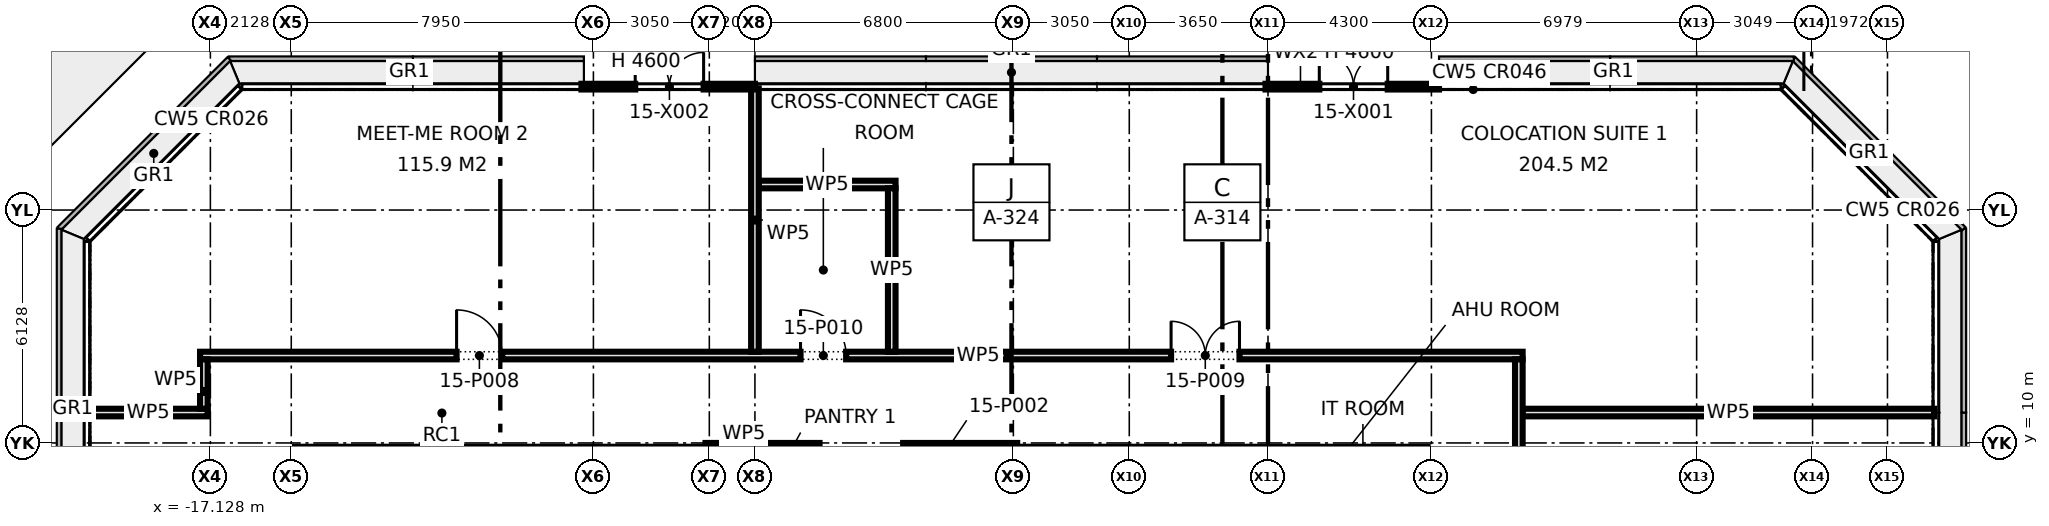
"""IFC4 building model, lengths in metres.
Left out: names, types, materials, properties, quantities, classifications, styles, units other than length and angle.
Written with IfcOpenShell. Run it as: python <this file> out.ifc"""

import sys

from ifc_helpers import new_model, si_unit, direction, frame, frame_2d, origin, place, context, subcontext, project, spatial, rectangle, extrude, element, fill, save


model = new_model("IFC4")
c1 = context("Model", 3, precision=1e-05, world=origin(), true_north=direction((0.0, 1.0)))
c2 = subcontext(c1, "Body", "Model", "MODEL_VIEW")
j1 = project(units=[si_unit("LENGTHUNIT", "METRE"), si_unit("PLANEANGLEUNIT", "RADIAN")], contexts=[c1])
p1 = place(None, origin())
s1 = spatial("IfcSite", under=j1, at=p1, CompositionType="ELEMENT")
p2 = place(p1, origin())
s2 = spatial("IfcBuilding", under=s1, at=p2, CompositionType="ELEMENT")
p3 = place(p2, frame((0.0, 0.0, 68.6)))
s3 = spatial("IfcBuildingStorey", under=s2, at=p3, CompositionType="ELEMENT", Elevation=68.6)
p4 = place(p3, frame((15.2, 19.375, 0.0), z_axis=(0.0, 0.0, 1.0), x_axis=(-1.0, 0.0, 0.0)))
e1 = element("IfcWall", 1, at=p4, inside=s3, PredefinedType="STANDARD", context=c2, shape_type="SweptSolid", body=[
    extrude(rectangle(XDim=4.565, YDim=0.15, at=frame_2d((2.282, 0.0))), origin(), (0.0, 0.0, 1.0), 4.6),
])
p5 = place(p4, frame((1.35, 0.0, 0.0)))
e2 = element("IfcOpeningElement", 2, at=p5, cuts=e1, PredefinedType="OPENING", context=c2, shape_type="SweptSolid", body=[
    extrude(rectangle(XDim=1.8, YDim=2.1, at=frame_2d((0.9, 1.05))), frame((0.0, 0.085, 0.0), z_axis=(0.0, -1.0, 0.0), x_axis=(1.0, 0.0, 0.0)), (0.0, 0.0, 1.0), 0.17),
])
p6 = place(p3, frame((-2.8, 19.375, 0.0), z_axis=(0.0, 0.0, 1.0), x_axis=(-1.0, 0.0, 0.0)))
e3 = element("IfcWall", 3, at=p6, inside=s3, PredefinedType="STANDARD", context=c2, shape_type="SweptSolid", body=[
    extrude(rectangle(XDim=4.565, YDim=0.15, at=frame_2d((2.282, 0.0))), origin(), (0.0, 0.0, 1.0), 4.6),
])
p7 = place(p6, frame((1.35, 0.0, 0.0)))
e4 = element("IfcOpeningElement", 4, at=p7, cuts=e3, PredefinedType="OPENING", context=c2, shape_type="SweptSolid", body=[
    extrude(rectangle(XDim=1.8, YDim=2.1, at=frame_2d((0.9, 1.05))), frame((0.0, 0.085, 0.0), z_axis=(0.0, -1.0, 0.0), x_axis=(1.0, 0.0, 0.0)), (0.0, 0.0, 1.0), 0.17),
])
for number, where, z_axis, x_axis in (
    (5, (-4.1, 9.9, 0.0), (0.0, 0.0, 1.0), (1.0, 0.0, 0.0)),
    (6, (1.1, 9.9, 0.0), (0.0, 0.0, 1.0), (1.0, 0.0, 0.0)),
):
    element("IfcWall", number, at=place(p3, frame(where, z_axis=z_axis, x_axis=x_axis)), inside=s3, PredefinedType="PARTITIONING", context=c2, shape_type="SweptSolid", body=[
        extrude(rectangle(XDim=3.0, YDim=0.2, at=frame_2d((1.5, 0.0))), origin(), (0.0, 0.0, 1.0), 3.463),
    ])
p8 = place(p3, frame((-20.33, 10.8, 0.0), z_axis=(0.0, 0.0, 1.0), x_axis=(1.0, 0.0, 0.0)))
e7 = element("IfcWall", 7, at=p8, inside=s3, PredefinedType="PARTITIONING", context=c2, shape_type="SweptSolid", body=[
    extrude(rectangle(XDim=3.13, YDim=0.2, at=frame_2d((1.565, 0.0))), origin(), (0.0, 0.0, 1.0), 4.4),
])
p9 = place(p3, frame((17.4, 10.8, 0.0), z_axis=(0.0, 0.0, 1.0), x_axis=(1.0, 0.0, 0.0)))
e8 = element("IfcWall", 8, at=p9, inside=s3, PredefinedType="PARTITIONING", context=c2, shape_type="SweptSolid", body=[
    extrude(rectangle(XDim=10.83, YDim=0.2, at=frame_2d((5.415, 0.0))), origin(), (0.0, 0.0, 1.0), 4.4),
])
p10 = place(p3, frame((-17.4, 12.3, 0.0), z_axis=(0.0, 0.0, 1.0), x_axis=(1.0, 0.0, 0.0)))
e9 = element("IfcWall", 9, at=p10, inside=s3, PredefinedType="PARTITIONING", context=c2, shape_type="SweptSolid", body=[
    extrude(rectangle(XDim=34.8, YDim=0.2, at=frame_2d((17.4, 0.0))), origin(), (0.0, 0.0, 1.0), 4.4),
])
p11 = place(p10, frame((6.75, 0.0, 0.0)))
e10 = element("IfcOpeningElement", 10, at=p11, cuts=e9, PredefinedType="OPENING", context=c2, shape_type="SweptSolid", body=[
    extrude(rectangle(XDim=1.2, YDim=2.1, at=frame_2d((0.6, 1.05))), frame((0.0, 0.11, 0.0), z_axis=(0.0, -1.0, 0.0), x_axis=(1.0, 0.0, 0.0)), (0.0, 0.0, 1.0), 0.22),
])
p12 = place(p10, frame((25.55, 0.0, 0.0)))
e11 = element("IfcOpeningElement", 11, at=p12, cuts=e9, PredefinedType="OPENING", context=c2, shape_type="SweptSolid", body=[
    extrude(rectangle(XDim=1.8, YDim=2.1, at=frame_2d((0.9, 1.05))), frame((0.0, 0.11, 0.0), z_axis=(0.0, -1.0, 0.0), x_axis=(1.0, 0.0, 0.0)), (0.0, 0.0, 1.0), 0.22),
])
p13 = place(p10, frame((15.8, 0.0, 0.0)))
e12 = element("IfcOpeningElement", 12, at=p13, cuts=e9, PredefinedType="OPENING", context=c2, shape_type="SweptSolid", body=[
    extrude(rectangle(XDim=1.2, YDim=2.1, at=frame_2d((0.6, 1.05))), frame((0.0, 0.11, 0.0), z_axis=(0.0, -1.0, 0.0), x_axis=(1.0, 0.0, 0.0)), (0.0, 0.0, 1.0), 0.22),
])
p14 = place(p3, frame((-2.7, 16.8, 0.0), z_axis=(0.0, 0.0, 1.0), x_axis=(1.0, 0.0, 0.0)))
e13 = element("IfcWall", 13, at=p14, inside=s3, PredefinedType="PARTITIONING", context=c2, shape_type="SweptSolid", body=[
    extrude(rectangle(XDim=3.6, YDim=0.2, at=frame_2d((1.8, 0.0))), origin(), (0.0, 0.0, 1.0), 4.4),
])
p15 = place(p3, frame((17.3, -12.2, 0.0), z_axis=(0.0, 0.0, 1.0), x_axis=(0.0, 1.0, 0.0)))
e14 = element("IfcWall", 14, at=p15, inside=s3, PredefinedType="PARTITIONING", context=c2, shape_type="SweptSolid", body=[
    extrude(rectangle(XDim=24.4, YDim=0.2, at=frame_2d((12.2, 0.0))), origin(), (0.0, 0.0, 1.0), 4.4),
])
p16 = place(p15, frame((6.35, 0.0, 0.0)))
e15 = element("IfcOpeningElement", 15, at=p16, cuts=e14, PredefinedType="OPENING", context=c2, shape_type="SweptSolid", body=[
    extrude(rectangle(XDim=1.2, YDim=2.1, at=frame_2d((0.6, 1.05))), frame((0.0, 0.11, 0.0), z_axis=(0.0, -1.0, 0.0), x_axis=(1.0, 0.0, 0.0)), (0.0, 0.0, 1.0), 0.22),
])
p17 = place(p15, frame((17.6, 0.0, 0.0)))
e16 = element("IfcOpeningElement", 16, at=p17, cuts=e14, PredefinedType="OPENING", context=c2, shape_type="SweptSolid", body=[
    extrude(rectangle(XDim=1.8, YDim=2.1, at=frame_2d((0.9, 1.05))), frame((0.0, 0.11, 0.0), z_axis=(0.0, -1.0, 0.0), x_axis=(1.0, 0.0, 0.0)), (0.0, 0.0, 1.0), 0.22),
])
p18 = place(p3, frame((0.8, 12.4, 0.0), z_axis=(0.0, 0.0, 1.0), x_axis=(0.0, 1.0, 0.0)))
e17 = element("IfcWall", 17, at=p18, inside=s3, PredefinedType="PARTITIONING", context=c2, shape_type="SweptSolid", body=[
    extrude(rectangle(XDim=4.3, YDim=0.2, at=frame_2d((2.15, 0.0))), origin(), (0.0, 0.0, 1.0), 4.4),
])
p19 = place(p3, frame((-2.8, 12.4, 0.0), z_axis=(0.0, 0.0, 1.0), x_axis=(0.0, 1.0, 0.0)))
e18 = element("IfcWall", 18, at=p19, inside=s3, PredefinedType="PARTITIONING", context=c2, shape_type="SweptSolid", body=[
    extrude(rectangle(XDim=6.93, YDim=0.2, at=frame_2d((3.465, 0.0))), origin(), (0.0, 0.0, 1.0), 4.4),
])
p20 = place(p3, frame((-17.3, 10.9, 0.0), z_axis=(0.0, 0.0, 1.0), x_axis=(0.0, 1.0, 0.0)))
e19 = element("IfcWall", 19, at=p20, inside=s3, PredefinedType="PARTITIONING", context=c2, shape_type="SweptSolid", body=[
    extrude(rectangle(XDim=1.3, YDim=0.2, at=frame_2d((0.65, 0.0))), origin(), (0.0, 0.0, 1.0), 4.4),
])
p21 = place(p5, frame((1.8, 0.0, 0.0), z_axis=(0.0, 0.0, 1.0), x_axis=(-1.0, 0.0, 0.0)))
e20 = element("IfcDoor", 20, at=p21, inside=s3, OperationType="DOUBLE_DOOR_DOUBLE_SWING", PredefinedType="DOOR", context=c2, shape_type="SweptSolid", body=[
    extrude(rectangle(XDim=1.8, YDim=2.1, at=frame_2d((0.9, 1.05))), frame((0.0, 0.025, 0.0), z_axis=(0.0, -1.0, 0.0), x_axis=(1.0, 0.0, 0.0)), (0.0, 0.0, 1.0), 0.05),
])
fill(e2, e20)
p22 = place(p7, frame((1.8, 0.0, 0.0), z_axis=(0.0, 0.0, 1.0), x_axis=(-1.0, 0.0, 0.0)))
e21 = element("IfcDoor", 21, at=p22, inside=s3, OperationType="DOUBLE_DOOR_DOUBLE_SWING", PredefinedType="DOOR", context=c2, shape_type="SweptSolid", body=[
    extrude(rectangle(XDim=1.8, YDim=2.1, at=frame_2d((0.9, 1.05))), frame((0.0, 0.025, 0.0), z_axis=(0.0, -1.0, 0.0), x_axis=(1.0, 0.0, 0.0)), (0.0, 0.0, 1.0), 0.05),
])
fill(e4, e21)
p23 = place(p11, origin())
e22 = element("IfcDoor", 22, at=p23, inside=s3, OperationType="SINGLE_SWING_LEFT", PredefinedType="DOOR", context=c2, shape_type="SweptSolid", body=[
    extrude(rectangle(XDim=1.2, YDim=2.1, at=frame_2d((0.6, 1.05))), frame((0.0, 0.025, 0.0), z_axis=(0.0, -1.0, 0.0), x_axis=(1.0, 0.0, 0.0)), (0.0, 0.0, 1.0), 0.05),
])
fill(e10, e22)
p24 = place(p12, origin())
e23 = element("IfcDoor", 23, at=p24, inside=s3, OperationType="DOUBLE_DOOR_SINGLE_SWING", PredefinedType="DOOR", context=c2, shape_type="SweptSolid", body=[
    extrude(rectangle(XDim=1.8, YDim=2.1, at=frame_2d((0.9, 1.05))), frame((0.0, 0.025, 0.0), z_axis=(0.0, -1.0, 0.0), x_axis=(1.0, 0.0, 0.0)), (0.0, 0.0, 1.0), 0.05),
])
fill(e11, e23)
p25 = place(p13, origin())
e24 = element("IfcDoor", 24, at=p25, inside=s3, OperationType="SINGLE_SWING_LEFT", PredefinedType="DOOR", context=c2, shape_type="SweptSolid", body=[
    extrude(rectangle(XDim=1.2, YDim=2.1, at=frame_2d((0.6, 1.05))), frame((0.0, 0.025, 0.0), z_axis=(0.0, -1.0, 0.0), x_axis=(1.0, 0.0, 0.0)), (0.0, 0.0, 1.0), 0.05),
])
fill(e12, e24)
save(model, sys.argv[1])
